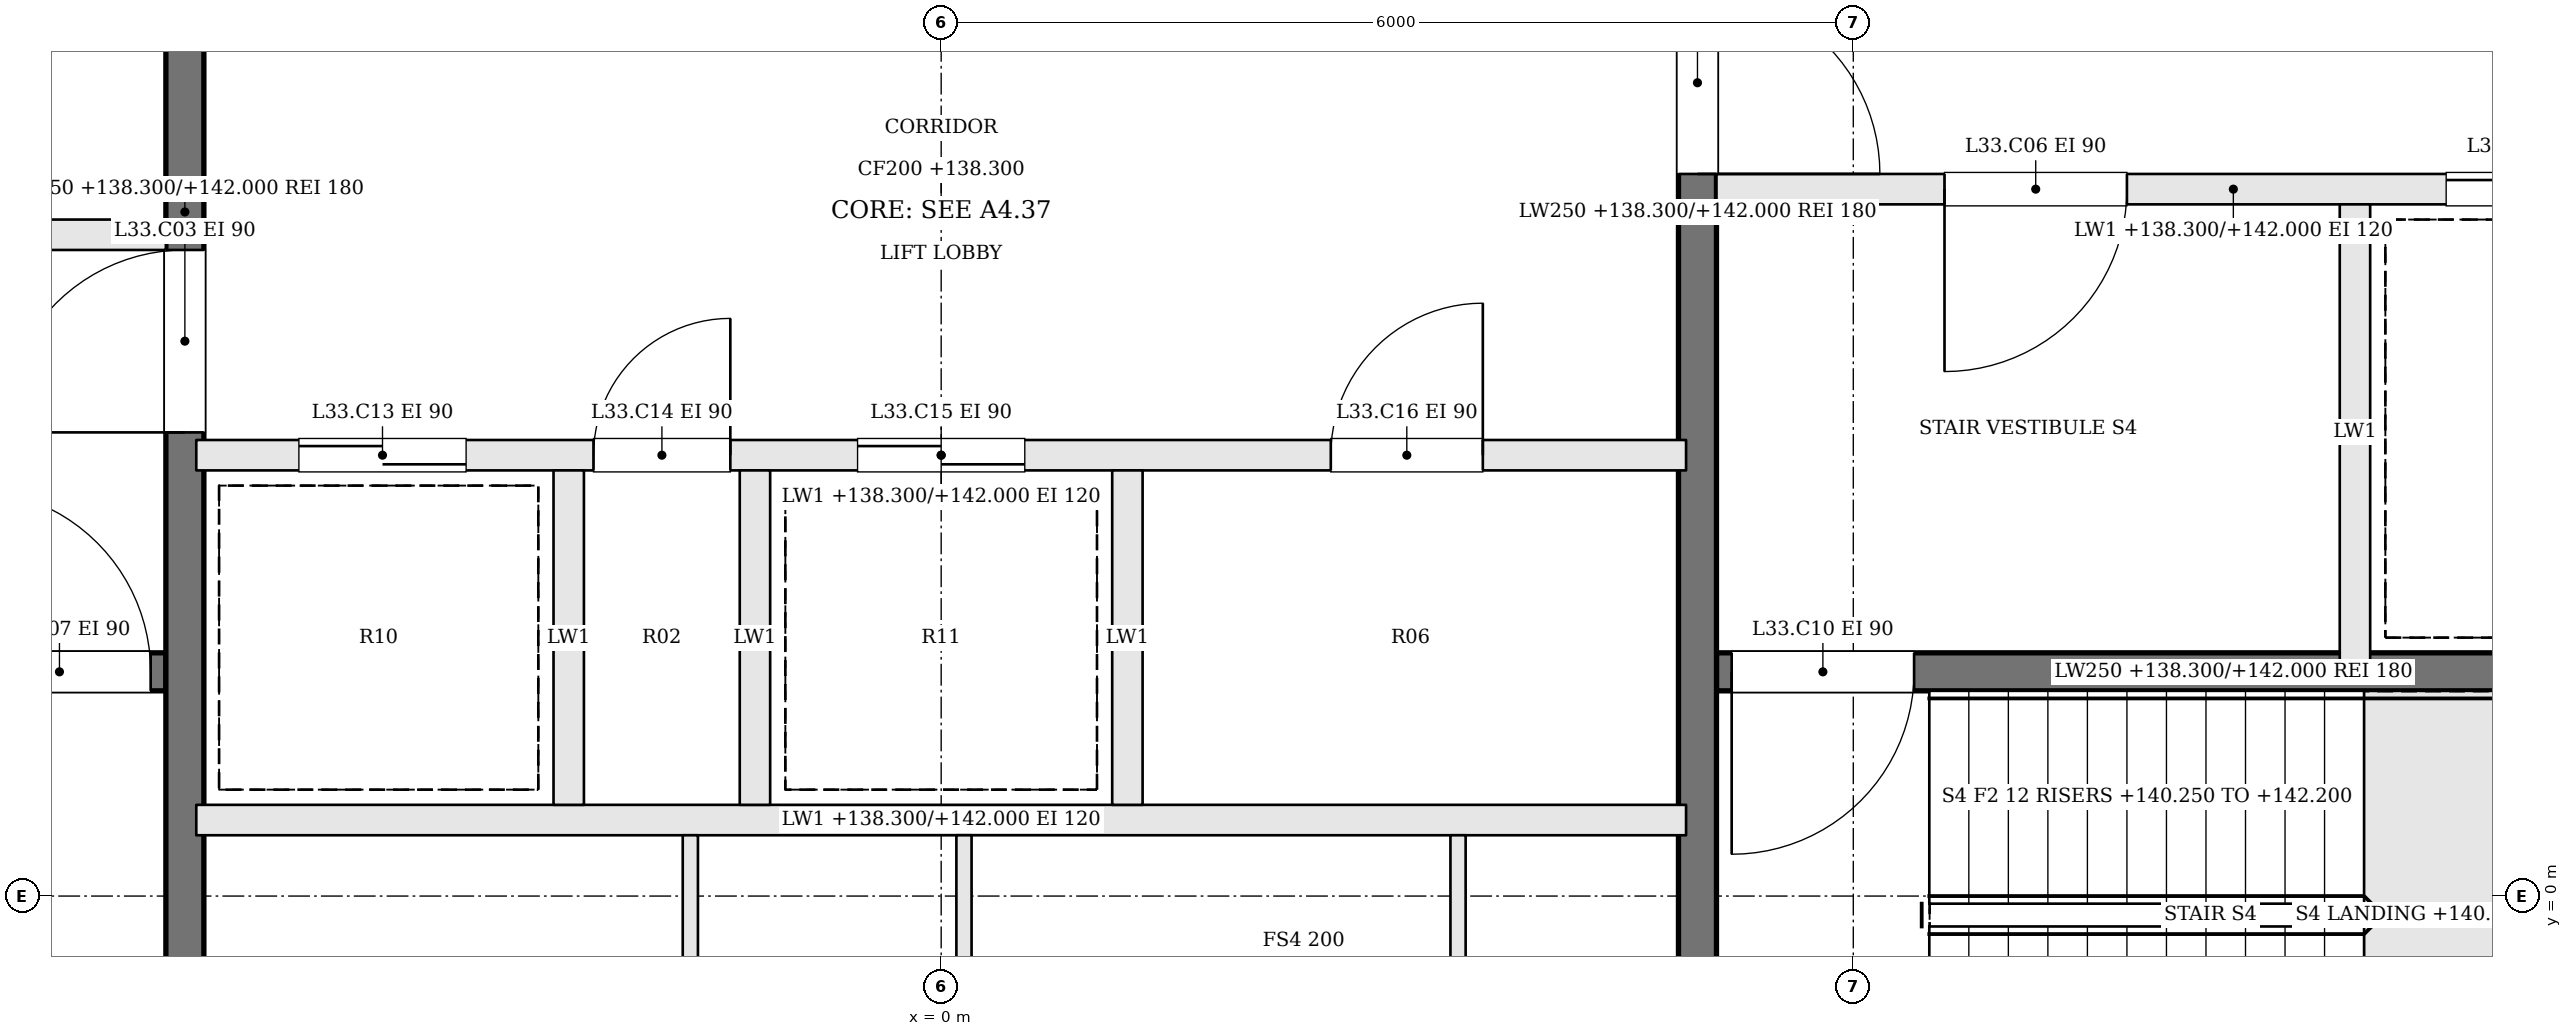
"""IFC4 building model, lengths in metres.
Left out: names, types, materials, properties, quantities, classifications, styles, units other than length and angle.
Written with IfcOpenShell. Run it as: python <this file> out.ifc"""

import sys

from ifc_helpers import new_model, si_unit, direction, frame, frame_2d, origin, place, context, subcontext, project, spatial, rectangle, extrude, element, fill, save


model = new_model("IFC4")
c1 = context("Model", 3, precision=1e-05, world=origin(), true_north=direction((0.0, 1.0)))
c2 = subcontext(c1, "Body", "Model", "MODEL_VIEW")
j1 = project(units=[si_unit("LENGTHUNIT", "METRE"), si_unit("PLANEANGLEUNIT", "RADIAN")], contexts=[c1])
p1 = place(None, origin())
s1 = spatial("IfcSite", under=j1, at=p1, CompositionType="ELEMENT")
p2 = place(p1, origin())
s2 = spatial("IfcBuilding", under=s1, at=p2, CompositionType="ELEMENT")
p3 = place(p2, frame((0.0, 0.0, 138.3)))
s3 = spatial("IfcBuildingStorey", under=s2, at=p3, CompositionType="ELEMENT", Elevation=138.3)
p4 = place(p3, frame((-11.9, 1.475, 0.0), z_axis=(0.0, 0.0, 1.0), x_axis=(1.0, 0.0, 0.0)))
e1 = element("IfcWall", 1, at=p4, inside=s3, PredefinedType="SOLIDWALL", context=c2, shape_type="SweptSolid", body=[
    extrude(rectangle(XDim=6.8, YDim=0.25, at=frame_2d((3.4, 0.0))), origin(), (0.0, 0.0, 1.0), 3.7),
])
p5 = place(p4, frame((5.5, 0.0, 0.0)))
e2 = element("IfcOpeningElement", 2, at=p5, cuts=e1, PredefinedType="OPENING", context=c2, shape_type="SweptSolid", body=[
    extrude(rectangle(XDim=1.2, YDim=2.1, at=frame_2d((0.6, 1.05))), frame((0.0, 0.135, 0.0), z_axis=(0.0, -1.0, 0.0), x_axis=(1.0, 0.0, 0.0)), (0.0, 0.0, 1.0), 0.27),
])
p6 = place(p3, frame((-11.9, 4.35, 0.0), z_axis=(0.0, 0.0, 1.0), x_axis=(1.0, 0.0, 0.0)))
e3 = element("IfcWall", 3, at=p6, inside=s3, PredefinedType="SOLIDWALL", context=c2, shape_type="SweptSolid", body=[
    extrude(rectangle(XDim=6.8, YDim=0.2, at=frame_2d((3.4, 0.0))), origin(), (0.0, 0.0, 1.0), 3.7),
])
p7 = place(p6, frame((4.1, 0.0, 0.0)))
e4 = element("IfcOpeningElement", 4, at=p7, cuts=e3, PredefinedType="OPENING", context=c2, shape_type="SweptSolid", body=[
    extrude(rectangle(XDim=1.2, YDim=2.1, at=frame_2d((0.6, 1.05))), frame((0.0, 0.11, 0.0), z_axis=(0.0, -1.0, 0.0), x_axis=(1.0, 0.0, 0.0)), (0.0, 0.0, 1.0), 0.22),
])
p8 = place(p6, frame((0.8, 0.0, 0.0)))
e5 = element("IfcOpeningElement", 5, at=p8, cuts=e3, PredefinedType="OPENING", context=c2, shape_type="SweptSolid", body=[
    extrude(rectangle(XDim=1.2, YDim=2.1, at=frame_2d((0.6, 1.05))), frame((0.0, 0.11, 0.0), z_axis=(0.0, -1.0, 0.0), x_axis=(1.0, 0.0, 0.0)), (0.0, 0.0, 1.0), 0.22),
])
p9 = place(p3, frame((11.9, 4.65, 0.0), z_axis=(0.0, 0.0, 1.0), x_axis=(-1.0, 0.0, 0.0)))
e6 = element("IfcWall", 6, at=p9, inside=s3, PredefinedType="SOLIDWALL", context=c2, shape_type="SweptSolid", body=[
    extrude(rectangle(XDim=6.8, YDim=0.2, at=frame_2d((3.4, 0.0))), origin(), (0.0, 0.0, 1.0), 3.7),
])
p10 = place(p9, frame((4.1, 0.0, 0.0)))
e7 = element("IfcOpeningElement", 7, at=p10, cuts=e6, PredefinedType="OPENING", context=c2, shape_type="SweptSolid", body=[
    extrude(rectangle(XDim=1.2, YDim=2.1, at=frame_2d((0.6, 1.05))), frame((0.0, 0.11, 0.0), z_axis=(0.0, -1.0, 0.0), x_axis=(1.0, 0.0, 0.0)), (0.0, 0.0, 1.0), 0.22),
])
p11 = place(p9, frame((0.8, 0.0, 0.0)))
e8 = element("IfcOpeningElement", 8, at=p11, cuts=e6, PredefinedType="OPENING", context=c2, shape_type="SweptSolid", body=[
    extrude(rectangle(XDim=1.2, YDim=2.1, at=frame_2d((0.6, 1.05))), frame((0.0, 0.11, 0.0), z_axis=(0.0, -1.0, 0.0), x_axis=(1.0, 0.0, 0.0)), (0.0, 0.0, 1.0), 0.22),
])
p12 = place(p3, frame((11.9, 1.475, 0.0), z_axis=(0.0, 0.0, 1.0), x_axis=(-1.0, 0.0, 0.0)))
e9 = element("IfcWall", 9, at=p12, inside=s3, PredefinedType="SOLIDWALL", context=c2, shape_type="SweptSolid", body=[
    extrude(rectangle(XDim=6.8, YDim=0.25, at=frame_2d((3.4, 0.0))), origin(), (0.0, 0.0, 1.0), 3.7),
])
p13 = place(p12, frame((5.5, 0.0, 0.0)))
e10 = element("IfcOpeningElement", 10, at=p13, cuts=e9, PredefinedType="OPENING", context=c2, shape_type="SweptSolid", body=[
    extrude(rectangle(XDim=1.2, YDim=2.1, at=frame_2d((0.6, 1.05))), frame((0.0, 0.135, 0.0), z_axis=(0.0, -1.0, 0.0), x_axis=(1.0, 0.0, 0.0)), (0.0, 0.0, 1.0), 0.27),
])
p14 = place(p3, frame((9.3, 4.55, 0.0), z_axis=(0.0, 0.0, 1.0), x_axis=(0.0, -1.0, 0.0)))
e11 = element("IfcWall", 11, at=p14, inside=s3, PredefinedType="SOLIDWALL", context=c2, shape_type="SweptSolid", body=[
    extrude(rectangle(XDim=3.0, YDim=0.2, at=frame_2d((1.5, 0.0))), origin(), (0.0, 0.0, 1.0), 3.7),
])
p15 = place(p3, frame((-4.975, -1.9, 0.0), z_axis=(0.0, 0.0, 1.0), x_axis=(0.0, 1.0, 0.0)))
e12 = element("IfcWall", 12, at=p15, inside=s3, PredefinedType="SOLIDWALL", context=c2, shape_type="SweptSolid", body=[
    extrude(rectangle(XDim=12.8, YDim=0.25, at=frame_2d((6.4, 0.0))), origin(), (0.0, 0.0, 1.0), 3.7),
])
p16 = place(p15, frame((4.95, 0.0, 0.0)))
e13 = element("IfcOpeningElement", 13, at=p16, cuts=e12, PredefinedType="OPENING", context=c2, shape_type="SweptSolid", body=[
    extrude(rectangle(XDim=1.2, YDim=2.1, at=frame_2d((0.6, 1.05))), frame((0.0, 0.135, 0.0), z_axis=(0.0, -1.0, 0.0), x_axis=(1.0, 0.0, 0.0)), (0.0, 0.0, 1.0), 0.27),
])
p17 = place(p3, frame((4.975, 10.9, 0.0), z_axis=(0.0, 0.0, 1.0), x_axis=(0.0, -1.0, 0.0)))
e14 = element("IfcWall", 14, at=p17, inside=s3, PredefinedType="SOLIDWALL", context=c2, shape_type="SweptSolid", body=[
    extrude(rectangle(XDim=12.8, YDim=0.25, at=frame_2d((6.4, 0.0))), origin(), (0.0, 0.0, 1.0), 3.7),
])
p18 = place(p17, frame((4.95, 0.0, 0.0)))
e15 = element("IfcOpeningElement", 15, at=p18, cuts=e14, PredefinedType="OPENING", context=c2, shape_type="SweptSolid", body=[
    extrude(rectangle(XDim=1.2, YDim=2.1, at=frame_2d((0.6, 1.05))), frame((0.0, 0.135, 0.0), z_axis=(0.0, -1.0, 0.0), x_axis=(1.0, 0.0, 0.0)), (0.0, 0.0, 1.0), 0.27),
])
p19 = place(p3, frame((-4.9, 0.5, 0.0), z_axis=(0.0, 0.0, 1.0), x_axis=(1.0, 0.0, 0.0)))
e16 = element("IfcWall", 16, at=p19, inside=s3, PredefinedType="SOLIDWALL", context=c2, shape_type="SweptSolid", body=[
    extrude(rectangle(XDim=9.8, YDim=0.2, at=frame_2d((4.9, 0.0))), origin(), (0.0, 0.0, 1.0), 3.7),
])
p20 = place(p3, frame((-4.9, 2.9, 0.0), z_axis=(0.0, 0.0, 1.0), x_axis=(1.0, 0.0, 0.0)))
e17 = element("IfcWall", 17, at=p20, inside=s3, PredefinedType="SOLIDWALL", context=c2, shape_type="SweptSolid", body=[
    extrude(rectangle(XDim=9.8, YDim=0.2, at=frame_2d((4.9, 0.0))), origin(), (0.0, 0.0, 1.0), 3.7),
])
p21 = place(p20, frame((0.675, 0.0, 0.0)))
e18 = element("IfcOpeningElement", 18, at=p21, cuts=e17, PredefinedType="OPENING", context=c2, shape_type="SweptSolid", body=[
    extrude(rectangle(XDim=1.1, YDim=2.1, at=frame_2d((0.55, 1.05))), frame((0.0, 0.11, 0.0), z_axis=(0.0, -1.0, 0.0), x_axis=(1.0, 0.0, 0.0)), (0.0, 0.0, 1.0), 0.22),
])
p22 = place(p20, frame((2.613, 0.0, 0.0)))
e19 = element("IfcOpeningElement", 19, at=p22, cuts=e17, PredefinedType="OPENING", context=c2, shape_type="SweptSolid", body=[
    extrude(rectangle(XDim=0.9, YDim=2.1, at=frame_2d((0.45, 1.05))), frame((0.0, 0.11, 0.0), z_axis=(0.0, -1.0, 0.0), x_axis=(1.0, 0.0, 0.0)), (0.0, 0.0, 1.0), 0.22),
])
p23 = place(p20, frame((4.35, 0.0, 0.0)))
e20 = element("IfcOpeningElement", 20, at=p23, cuts=e17, PredefinedType="OPENING", context=c2, shape_type="SweptSolid", body=[
    extrude(rectangle(XDim=1.1, YDim=2.1, at=frame_2d((0.55, 1.05))), frame((0.0, 0.11, 0.0), z_axis=(0.0, -1.0, 0.0), x_axis=(1.0, 0.0, 0.0)), (0.0, 0.0, 1.0), 0.22),
])
p24 = place(p20, frame((7.463, 0.0, 0.0)))
e21 = element("IfcOpeningElement", 21, at=p24, cuts=e17, PredefinedType="OPENING", context=c2, shape_type="SweptSolid", body=[
    extrude(rectangle(XDim=1.0, YDim=2.1, at=frame_2d((0.5, 1.05))), frame((0.0, 0.11, 0.0), z_axis=(0.0, -1.0, 0.0), x_axis=(1.0, 0.0, 0.0)), (0.0, 0.0, 1.0), 0.22),
])
for number, where, z_axis, x_axis in (
    (22, (-2.45, 0.6, 0.0), (0.0, 0.0, 1.0), (0.0, 1.0, 0.0)),
    (23, (-1.225, 0.6, 0.0), (0.0, 0.0, 1.0), (0.0, 1.0, 0.0)),
    (24, (1.225, 0.6, 0.0), (0.0, 0.0, 1.0), (0.0, 1.0, 0.0)),
):
    element("IfcWall", number, at=place(p3, frame(where, z_axis=z_axis, x_axis=x_axis)), inside=s3, PredefinedType="SOLIDWALL", context=c2, shape_type="SweptSolid", body=[
        extrude(rectangle(XDim=2.2, YDim=0.2, at=frame_2d((1.1, 0.0))), origin(), (0.0, 0.0, 1.0), 3.7),
    ])
for number, where, z_axis, x_axis in (
    (25, (-1.65, -1.9, 0.0), (0.0, 0.0, 1.0), (0.0, 1.0, 0.0)),
    (26, (0.15, -1.9, 0.0), (0.0, 0.0, 1.0), (0.0, 1.0, 0.0)),
    (27, (3.4, -1.9, 0.0), (0.0, 0.0, 1.0), (0.0, 1.0, 0.0)),
):
    element("IfcWall", number, at=place(p3, frame(where, z_axis=z_axis, x_axis=x_axis)), inside=s3, PredefinedType="PARTITIONING", context=c2, shape_type="SweptSolid", body=[
        extrude(rectangle(XDim=2.3, YDim=0.1, at=frame_2d((1.15, 0.0))), origin(), (0.0, 0.0, 1.0), 3.7),
    ])
p25 = place(p16, origin())
e28 = element("IfcDoor", 28, at=p25, inside=s3, OperationType="SINGLE_SWING_LEFT", PredefinedType="DOOR", context=c2, shape_type="SweptSolid", body=[
    extrude(rectangle(XDim=1.2, YDim=2.1, at=frame_2d((0.6, 1.05))), frame((0.0, 0.025, 0.0), z_axis=(0.0, -1.0, 0.0), x_axis=(1.0, 0.0, 0.0)), (0.0, 0.0, 1.0), 0.05),
])
fill(e13, e28)
p26 = place(p18, origin())
e29 = element("IfcDoor", 29, at=p26, inside=s3, OperationType="SINGLE_SWING_RIGHT", PredefinedType="DOOR", context=c2, shape_type="SweptSolid", body=[
    extrude(rectangle(XDim=1.2, YDim=2.1, at=frame_2d((0.6, 1.05))), frame((0.0, 0.025, 0.0), z_axis=(0.0, -1.0, 0.0), x_axis=(1.0, 0.0, 0.0)), (0.0, 0.0, 1.0), 0.05),
])
fill(e15, e29)
p27 = place(p10, origin())
e30 = element("IfcDoor", 30, at=p27, inside=s3, OperationType="SINGLE_SWING_RIGHT", PredefinedType="DOOR", context=c2, shape_type="SweptSolid", body=[
    extrude(rectangle(XDim=1.2, YDim=2.1, at=frame_2d((0.6, 1.05))), frame((0.0, 0.025, 0.0), z_axis=(0.0, -1.0, 0.0), x_axis=(1.0, 0.0, 0.0)), (0.0, 0.0, 1.0), 0.05),
])
fill(e7, e30)
p28 = place(p5, origin())
e31 = element("IfcDoor", 31, at=p28, inside=s3, OperationType="SINGLE_SWING_LEFT", PredefinedType="DOOR", context=c2, shape_type="SweptSolid", body=[
    extrude(rectangle(XDim=1.2, YDim=2.1, at=frame_2d((0.6, 1.05))), frame((0.0, 0.025, 0.0), z_axis=(0.0, -1.0, 0.0), x_axis=(1.0, 0.0, 0.0)), (0.0, 0.0, 1.0), 0.05),
])
fill(e2, e31)
p29 = place(p13, origin())
e32 = element("IfcDoor", 32, at=p29, inside=s3, OperationType="SINGLE_SWING_RIGHT", PredefinedType="DOOR", context=c2, shape_type="SweptSolid", body=[
    extrude(rectangle(XDim=1.2, YDim=2.1, at=frame_2d((0.6, 1.05))), frame((0.0, 0.025, 0.0), z_axis=(0.0, -1.0, 0.0), x_axis=(1.0, 0.0, 0.0)), (0.0, 0.0, 1.0), 0.05),
])
fill(e10, e32)
p30 = place(p11, origin())
e33 = element("IfcDoor", 33, at=p30, inside=s3, OperationType="SLIDING_TO_RIGHT", PredefinedType="DOOR", context=c2, shape_type="SweptSolid", body=[
    extrude(rectangle(XDim=1.2, YDim=2.1, at=frame_2d((0.6, 1.05))), frame((0.0, 0.025, 0.0), z_axis=(0.0, -1.0, 0.0), x_axis=(1.0, 0.0, 0.0)), (0.0, 0.0, 1.0), 0.05),
])
fill(e8, e33)
p31 = place(p21, origin())
e34 = element("IfcDoor", 34, at=p31, inside=s3, OperationType="SLIDING_TO_RIGHT", PredefinedType="DOOR", context=c2, shape_type="SweptSolid", body=[
    extrude(rectangle(XDim=1.1, YDim=2.1, at=frame_2d((0.55, 1.05))), frame((0.0, 0.025, 0.0), z_axis=(0.0, -1.0, 0.0), x_axis=(1.0, 0.0, 0.0)), (0.0, 0.0, 1.0), 0.05),
])
fill(e18, e34)
p32 = place(p22, origin())
e35 = element("IfcDoor", 35, at=p32, inside=s3, OperationType="SINGLE_SWING_RIGHT", PredefinedType="DOOR", context=c2, shape_type="SweptSolid", body=[
    extrude(rectangle(XDim=0.9, YDim=2.1, at=frame_2d((0.45, 1.05))), frame((0.0, 0.025, 0.0), z_axis=(0.0, -1.0, 0.0), x_axis=(1.0, 0.0, 0.0)), (0.0, 0.0, 1.0), 0.05),
])
fill(e19, e35)
p33 = place(p23, origin())
e36 = element("IfcDoor", 36, at=p33, inside=s3, OperationType="SLIDING_TO_LEFT", PredefinedType="DOOR", context=c2, shape_type="SweptSolid", body=[
    extrude(rectangle(XDim=1.1, YDim=2.1, at=frame_2d((0.55, 1.05))), frame((0.0, 0.025, 0.0), z_axis=(0.0, -1.0, 0.0), x_axis=(1.0, 0.0, 0.0)), (0.0, 0.0, 1.0), 0.05),
])
fill(e20, e36)
p34 = place(p24, origin())
e37 = element("IfcDoor", 37, at=p34, inside=s3, OperationType="SINGLE_SWING_RIGHT", PredefinedType="DOOR", context=c2, shape_type="SweptSolid", body=[
    extrude(rectangle(XDim=1.0, YDim=2.1, at=frame_2d((0.5, 1.05))), frame((0.0, 0.025, 0.0), z_axis=(0.0, -1.0, 0.0), x_axis=(1.0, 0.0, 0.0)), (0.0, 0.0, 1.0), 0.05),
])
fill(e21, e37)
save(model, sys.argv[1])
